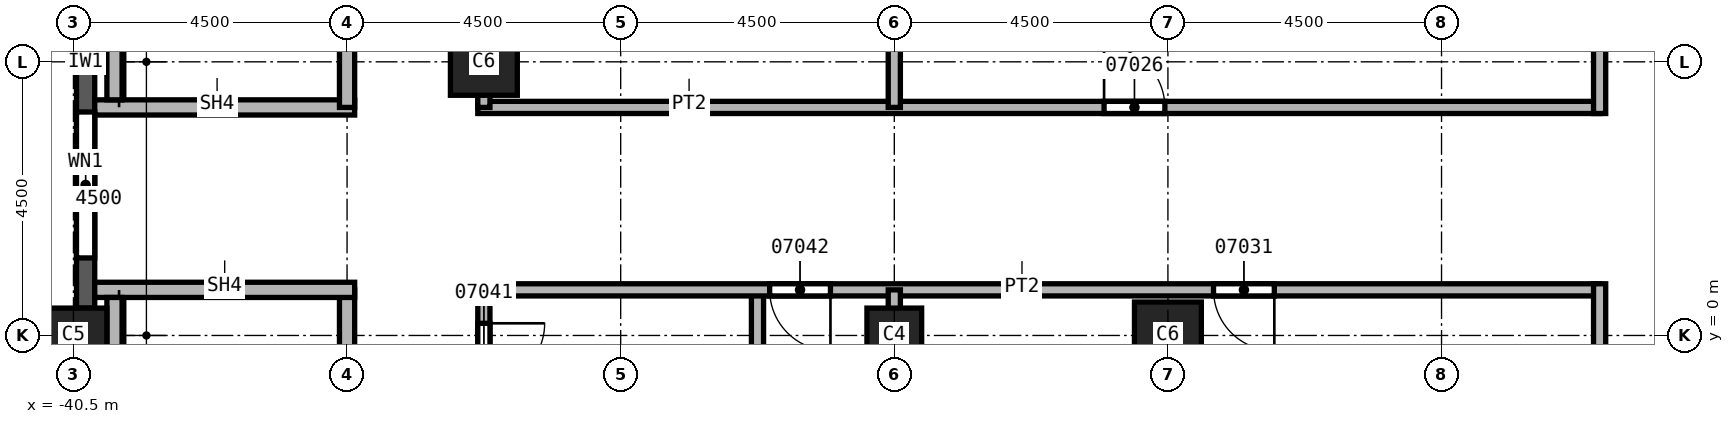
"""IFC4 building model, lengths in metres.
Left out: names, types, materials, properties, quantities, classifications, styles, units other than length and angle.
Written with IfcOpenShell. Run it as: python <this file> out.ifc"""

import sys

from ifc_helpers import new_model, si_unit, direction, frame, frame_2d, origin, origin_2d, place, context, subcontext, project, spatial, rectangle, extrude, element, fill, save


model = new_model("IFC4")
c1 = context("Model", 3, precision=1e-05, world=origin(), true_north=direction((0.0, 1.0)))
c2 = subcontext(c1, "Body", "Model", "MODEL_VIEW")
j1 = project(units=[si_unit("LENGTHUNIT", "METRE"), si_unit("PLANEANGLEUNIT", "RADIAN")], contexts=[c1])
p1 = place(None, origin())
s1 = spatial("IfcSite", under=j1, at=p1, CompositionType="ELEMENT")
p2 = place(p1, origin())
s2 = spatial("IfcBuilding", under=s1, at=p2, CompositionType="ELEMENT")
p3 = place(p2, frame((0.0, 0.0, 138.0)))
s3 = spatial("IfcBuildingStorey", under=s2, at=p3, CompositionType="ELEMENT", Elevation=138.0)
p4 = place(p3, frame((-40.5, 0.0, 0.0), z_axis=(0.0, 0.0, 1.0), x_axis=(0.0, 1.0, 0.0)))
e1 = element("IfcColumn", 1, at=p4, inside=s3, PredefinedType="COLUMN", context=c2, shape_type="SweptSolid", body=[
    extrude(rectangle(XDim=0.9, YDim=1.1, at=origin_2d()), origin(), (0.0, 0.0, 1.0), 3.7),
])
for number, where, z_axis, x_axis in (
    (2, (-33.75, 4.5, 0.0), (0.0, 0.0, 1.0), (1.0, 0.0, 0.0)),
    (3, (-22.5, 0.0, 0.0), (0.0, 0.0, 1.0), (1.0, 0.0, 0.0)),
):
    element("IfcColumn", number, at=place(p3, frame(where, z_axis=z_axis, x_axis=x_axis)), inside=s3, PredefinedType="COLUMN", context=c2, shape_type="SweptSolid", body=[
        extrude(rectangle(XDim=1.1, YDim=1.1, at=origin_2d()), origin(), (0.0, 0.0, 1.0), 3.7),
    ])
p5 = place(p3, frame((-27.0, 0.0, 0.0), z_axis=(0.0, 0.0, 1.0), x_axis=(1.0, 0.0, 0.0)))
e4 = element("IfcColumn", 4, at=p5, inside=s3, PredefinedType="COLUMN", context=c2, shape_type="SweptSolid", body=[
    extrude(rectangle(XDim=0.9, YDim=0.9, at=origin_2d()), origin(), (0.0, 0.0, 1.0), 3.7),
])
p6 = place(p3, frame((-40.3, 8.55, 0.0), z_axis=(0.0, 0.0, 1.0), x_axis=(0.0, -1.0, 0.0)))
e5 = element("IfcWall", 5, at=p6, inside=s3, PredefinedType="SOLIDWALL", context=c2, shape_type="SweptSolid", body=[
    extrude(rectangle(XDim=8.1, YDim=0.3, at=frame_2d((4.05, 0.0))), origin(), (0.0, 0.0, 1.0), 3.1),
])
p7 = place(p6, frame((0.825, 0.0, 0.8)))
e6 = element("IfcOpeningElement", 6, at=p7, cuts=e5, PredefinedType="OPENING", context=c2, shape_type="SweptSolid", body=[
    extrude(rectangle(XDim=2.4, YDim=1.95, at=frame_2d((1.2, 0.975))), frame((0.0, 0.15, 0.0), z_axis=(0.0, -1.0, 0.0), x_axis=(1.0, 0.0, 0.0)), (0.0, 0.0, 1.0), 0.3),
])
p8 = place(p6, frame((4.875, 0.0, 0.8)))
e7 = element("IfcOpeningElement", 7, at=p8, cuts=e5, PredefinedType="OPENING", context=c2, shape_type="SweptSolid", body=[
    extrude(rectangle(XDim=2.4, YDim=1.95, at=frame_2d((1.2, 0.975))), frame((0.0, 0.15, 0.0), z_axis=(0.0, -1.0, 0.0), x_axis=(1.0, 0.0, 0.0)), (0.0, 0.0, 1.0), 0.3),
])
p9 = place(p3, frame((-33.85, 3.75, 0.0), z_axis=(0.0, 0.0, 1.0), x_axis=(1.0, 0.0, 0.0)))
e8 = element("IfcWall", 8, at=p9, inside=s3, PredefinedType="PARTITIONING", context=c2, shape_type="SweptSolid", body=[
    extrude(rectangle(XDim=18.45, YDim=0.2, at=frame_2d((9.225, 0.0))), origin(), (0.0, 0.0, 1.0), 3.7),
])
p10 = place(p9, frame((10.3, 0.0, 0.0)))
e9 = element("IfcOpeningElement", 9, at=p10, cuts=e8, PredefinedType="OPENING", context=c2, shape_type="SweptSolid", body=[
    extrude(rectangle(XDim=1.0, YDim=2.1, at=frame_2d((0.5, 1.05))), frame((0.0, 0.1, 0.0), z_axis=(0.0, -1.0, 0.0), x_axis=(1.0, 0.0, 0.0)), (0.0, 0.0, 1.0), 0.2),
])
p11 = place(p3, frame((-33.75, 0.75, 0.0), z_axis=(0.0, 0.0, 1.0), x_axis=(0.0, -1.0, 0.0)))
e10 = element("IfcWall", 10, at=p11, inside=s3, PredefinedType="PARTITIONING", context=c2, shape_type="SweptSolid", body=[
    extrude(rectangle(XDim=7.6, YDim=0.2, at=frame_2d((3.8, 0.0))), origin(), (0.0, 0.0, 1.0), 3.7),
])
p12 = place(p11, frame((0.55, 0.0, 0.0)))
e11 = element("IfcOpeningElement", 11, at=p12, cuts=e10, PredefinedType="OPENING", context=c2, shape_type="SweptSolid", body=[
    extrude(rectangle(XDim=1.0, YDim=2.1, at=frame_2d((0.5, 1.05))), frame((0.0, 0.1, 0.0), z_axis=(0.0, -1.0, 0.0), x_axis=(1.0, 0.0, 0.0)), (0.0, 0.0, 1.0), 0.2),
])
p13 = place(p3, frame((-33.75, 11.25, 0.0), z_axis=(0.0, 0.0, 1.0), x_axis=(0.0, -1.0, 0.0)))
e12 = element("IfcWall", 12, at=p13, inside=s3, PredefinedType="PARTITIONING", context=c2, shape_type="SweptSolid", body=[
    extrude(rectangle(XDim=7.5, YDim=0.2, at=frame_2d((3.75, 0.0))), origin(), (0.0, 0.0, 1.0), 3.7),
])
p14 = place(p13, frame((1.45, 0.0, 0.0)))
e13 = element("IfcOpeningElement", 13, at=p14, cuts=e12, PredefinedType="OPENING", context=c2, shape_type="SweptSolid", body=[
    extrude(rectangle(XDim=1.0, YDim=2.1, at=frame_2d((0.5, 1.05))), frame((0.0, 0.1, 0.0), z_axis=(0.0, -1.0, 0.0), x_axis=(1.0, 0.0, 0.0)), (0.0, 0.0, 1.0), 0.2),
])
p15 = place(p3, frame((-29.25, 0.75, 0.0), z_axis=(0.0, 0.0, 1.0), x_axis=(0.0, -1.0, 0.0)))
e14 = element("IfcWall", 14, at=p15, inside=s3, PredefinedType="PARTITIONING", context=c2, shape_type="SweptSolid", body=[
    extrude(rectangle(XDim=18.4, YDim=0.2, at=frame_2d((9.2, 0.0))), origin(), (0.0, 0.0, 1.0), 3.7),
])
p16 = place(p3, frame((-15.4, 0.75, 0.0), z_axis=(0.0, 0.0, 1.0), x_axis=(-1.0, 0.0, 0.0)))
e15 = element("IfcWall", 15, at=p16, inside=s3, PredefinedType="PARTITIONING", context=c2, shape_type="SweptSolid", body=[
    extrude(rectangle(XDim=18.45, YDim=0.2, at=frame_2d((9.225, 0.0))), origin(), (0.0, 0.0, 1.0), 3.7),
])
p17 = place(p16, frame((5.35, 0.0, 0.0)))
e16 = element("IfcOpeningElement", 16, at=p17, cuts=e15, PredefinedType="OPENING", context=c2, shape_type="SweptSolid", body=[
    extrude(rectangle(XDim=1.0, YDim=2.1, at=frame_2d((0.5, 1.05))), frame((0.0, 0.1, 0.0), z_axis=(0.0, -1.0, 0.0), x_axis=(1.0, 0.0, 0.0)), (0.0, 0.0, 1.0), 0.2),
])
p18 = place(p16, frame((12.65, 0.0, 0.0)))
e17 = element("IfcOpeningElement", 17, at=p18, cuts=e15, PredefinedType="OPENING", context=c2, shape_type="SweptSolid", body=[
    extrude(rectangle(XDim=1.0, YDim=2.1, at=frame_2d((0.5, 1.05))), frame((0.0, 0.1, 0.0), z_axis=(0.0, -1.0, 0.0), x_axis=(1.0, 0.0, 0.0)), (0.0, 0.0, 1.0), 0.2),
])
p19 = place(p3, frame((-27.0, -17.45, 0.0), z_axis=(0.0, 0.0, 1.0), x_axis=(0.0, 1.0, 0.0)))
e18 = element("IfcWall", 18, at=p19, inside=s3, PredefinedType="PARTITIONING", context=c2, shape_type="SweptSolid", body=[
    extrude(rectangle(XDim=18.2, YDim=0.2, at=frame_2d((9.1, 0.0))), origin(), (0.0, 0.0, 1.0), 3.7),
])
p20 = place(p3, frame((-27.0, 3.75, 0.0), z_axis=(0.0, 0.0, 1.0), x_axis=(0.0, 1.0, 0.0)))
e19 = element("IfcWall", 19, at=p20, inside=s3, PredefinedType="PARTITIONING", context=c2, shape_type="SweptSolid", body=[
    extrude(rectangle(XDim=13.7, YDim=0.2, at=frame_2d((6.85, 0.0))), origin(), (0.0, 0.0, 1.0), 3.7),
])
p21 = place(p3, frame((-15.4, -23.25, 0.0), z_axis=(0.0, 0.0, 1.0), x_axis=(0.0, 1.0, 0.0)))
e20 = element("IfcWall", 20, at=p21, inside=s3, PredefinedType="PARTITIONING", context=c2, shape_type="SweptSolid", body=[
    extrude(rectangle(XDim=24.1, YDim=0.2, at=frame_2d((12.05, 0.0))), origin(), (0.0, 0.0, 1.0), 3.7),
])
p22 = place(p21, frame((2.35, 0.0, 0.0)))
e21 = element("IfcOpeningElement", 21, at=p22, cuts=e20, PredefinedType="OPENING", context=c2, shape_type="SweptSolid", body=[
    extrude(rectangle(XDim=1.0, YDim=2.1, at=frame_2d((0.5, 1.05))), frame((0.0, 0.1, 0.0), z_axis=(0.0, -1.0, 0.0), x_axis=(1.0, 0.0, 0.0)), (0.0, 0.0, 1.0), 0.2),
])
p23 = place(p21, frame((6.275, 0.0, 0.0)))
e22 = element("IfcOpeningElement", 22, at=p23, cuts=e20, PredefinedType="OPENING", context=c2, shape_type="SweptSolid", body=[
    extrude(rectangle(XDim=1.0, YDim=2.1, at=frame_2d((0.5, 1.05))), frame((0.0, 0.1, 0.0), z_axis=(0.0, -1.0, 0.0), x_axis=(1.0, 0.0, 0.0)), (0.0, 0.0, 1.0), 0.2),
])
p24 = place(p21, frame((11.25, 0.0, 0.0)))
e23 = element("IfcOpeningElement", 23, at=p24, cuts=e20, PredefinedType="OPENING", context=c2, shape_type="SweptSolid", body=[
    extrude(rectangle(XDim=1.0, YDim=2.1, at=frame_2d((0.5, 1.05))), frame((0.0, 0.1, 0.0), z_axis=(0.0, -1.0, 0.0), x_axis=(1.0, 0.0, 0.0)), (0.0, 0.0, 1.0), 0.2),
])
p25 = place(p3, frame((-15.4, 3.65, 0.0), z_axis=(0.0, 0.0, 1.0), x_axis=(0.0, 1.0, 0.0)))
e24 = element("IfcWall", 24, at=p25, inside=s3, PredefinedType="PARTITIONING", context=c2, shape_type="SweptSolid", body=[
    extrude(rectangle(XDim=9.95, YDim=0.2, at=frame_2d((4.975, 0.0))), origin(), (0.0, 0.0, 1.0), 3.7),
])
p26 = place(p3, frame((-40.15, 3.75, 0.0), z_axis=(0.0, 0.0, 1.0), x_axis=(1.0, 0.0, 0.0)))
e25 = element("IfcWall", 25, at=p26, inside=s3, PredefinedType="SOLIDWALL", context=c2, shape_type="SweptSolid", body=[
    extrude(rectangle(XDim=4.275, YDim=0.25, at=frame_2d((2.137, 0.0))), origin(), (0.0, 0.0, 1.0), 3.7),
])
p27 = place(p3, frame((-36.0, 0.75, 0.0), z_axis=(0.0, 0.0, 1.0), x_axis=(0.0, -1.0, 0.0)))
e26 = element("IfcWall", 26, at=p27, inside=s3, PredefinedType="SOLIDWALL", context=c2, shape_type="SweptSolid", body=[
    extrude(rectangle(XDim=7.625, YDim=0.25, at=frame_2d((3.812, 0.0))), origin(), (0.0, 0.0, 1.0), 3.7),
])
p28 = place(p27, frame((5.95, 0.0, 0.0)))
e27 = element("IfcOpeningElement", 27, at=p28, cuts=e26, PredefinedType="OPENING", context=c2, shape_type="SweptSolid", body=[
    extrude(rectangle(XDim=1.2, YDim=2.1, at=frame_2d((0.6, 1.05))), frame((0.0, 0.125, 0.0), z_axis=(0.0, -1.0, 0.0), x_axis=(1.0, 0.0, 0.0)), (0.0, 0.0, 1.0), 0.25),
])
p29 = place(p3, frame((-36.0, 11.375, 0.0), z_axis=(0.0, 0.0, 1.0), x_axis=(0.0, -1.0, 0.0)))
e28 = element("IfcWall", 28, at=p29, inside=s3, PredefinedType="SOLIDWALL", context=c2, shape_type="SweptSolid", body=[
    extrude(rectangle(XDim=7.625, YDim=0.25, at=frame_2d((3.812, 0.0))), origin(), (0.0, 0.0, 1.0), 3.7),
])
p30 = place(p29, frame((0.4, 0.0, 0.0)))
e29 = element("IfcOpeningElement", 29, at=p30, cuts=e28, PredefinedType="OPENING", context=c2, shape_type="SweptSolid", body=[
    extrude(rectangle(XDim=1.2, YDim=2.1, at=frame_2d((0.6, 1.05))), frame((0.0, 0.125, 0.0), z_axis=(0.0, -1.0, 0.0), x_axis=(1.0, 0.0, 0.0)), (0.0, 0.0, 1.0), 0.25),
])
p31 = place(p3, frame((-35.875, 0.75, 0.0), z_axis=(0.0, 0.0, 1.0), x_axis=(-1.0, 0.0, 0.0)))
e30 = element("IfcWall", 30, at=p31, inside=s3, PredefinedType="SOLIDWALL", context=c2, shape_type="SweptSolid", body=[
    extrude(rectangle(XDim=4.275, YDim=0.25, at=frame_2d((2.137, 0.0))), origin(), (0.0, 0.0, 1.0), 3.7),
])
for number, where, z_axis, x_axis in (
    (31, (-39.825, 3.875, 0.0), (0.0, 0.0, 1.0), (0.0, 1.0, 0.0)),
    (32, (-39.825, -6.625, 0.0), (0.0, 0.0, 1.0), (0.0, 1.0, 0.0)),
):
    element("IfcWall", number, at=place(p3, frame(where, z_axis=z_axis, x_axis=x_axis)), inside=s3, PredefinedType="SOLIDWALL", context=c2, shape_type="SweptSolid", body=[
        extrude(rectangle(XDim=7.25, YDim=0.25, at=frame_2d((3.625, 0.0))), origin(), (0.0, 0.0, 1.0), 3.7),
    ])
p32 = place(p8, origin())
e33 = element("IfcWindow", 33, at=p32, inside=s3, PartitioningType="SINGLE_PANEL", PredefinedType="WINDOW", context=c2, shape_type="SweptSolid", body=[
    extrude(rectangle(XDim=2.4, YDim=1.95, at=frame_2d((1.2, 0.975))), frame((0.0, 0.03, 0.0), z_axis=(0.0, -1.0, 0.0), x_axis=(1.0, 0.0, 0.0)), (0.0, 0.0, 1.0), 0.06),
])
fill(e7, e33)
p33 = place(p10, origin())
e34 = element("IfcDoor", 34, at=p33, inside=s3, OperationType="SINGLE_SWING_LEFT", PredefinedType="DOOR", context=c2, shape_type="SweptSolid", body=[
    extrude(rectangle(XDim=1.0, YDim=2.1, at=frame_2d((0.5, 1.05))), frame((0.0, 0.025, 0.0), z_axis=(0.0, -1.0, 0.0), x_axis=(1.0, 0.0, 0.0)), (0.0, 0.0, 1.0), 0.05),
])
fill(e9, e34)
p34 = place(p17, origin())
e35 = element("IfcDoor", 35, at=p34, inside=s3, OperationType="SINGLE_SWING_RIGHT", PredefinedType="DOOR", context=c2, shape_type="SweptSolid", body=[
    extrude(rectangle(XDim=1.0, YDim=2.1, at=frame_2d((0.5, 1.05))), frame((0.0, 0.025, 0.0), z_axis=(0.0, -1.0, 0.0), x_axis=(1.0, 0.0, 0.0)), (0.0, 0.0, 1.0), 0.05),
])
fill(e16, e35)
p35 = place(p12, origin())
e36 = element("IfcDoor", 36, at=p35, inside=s3, OperationType="SINGLE_SWING_RIGHT", PredefinedType="DOOR", context=c2, shape_type="SweptSolid", body=[
    extrude(rectangle(XDim=1.0, YDim=2.1, at=frame_2d((0.5, 1.05))), frame((0.0, 0.025, 0.0), z_axis=(0.0, -1.0, 0.0), x_axis=(1.0, 0.0, 0.0)), (0.0, 0.0, 1.0), 0.05),
])
fill(e11, e36)
p36 = place(p18, origin())
e37 = element("IfcDoor", 37, at=p36, inside=s3, OperationType="SINGLE_SWING_LEFT", PredefinedType="DOOR", context=c2, shape_type="SweptSolid", body=[
    extrude(rectangle(XDim=1.0, YDim=2.1, at=frame_2d((0.5, 1.05))), frame((0.0, 0.025, 0.0), z_axis=(0.0, -1.0, 0.0), x_axis=(1.0, 0.0, 0.0)), (0.0, 0.0, 1.0), 0.05),
])
fill(e17, e37)
save(model, sys.argv[1])
